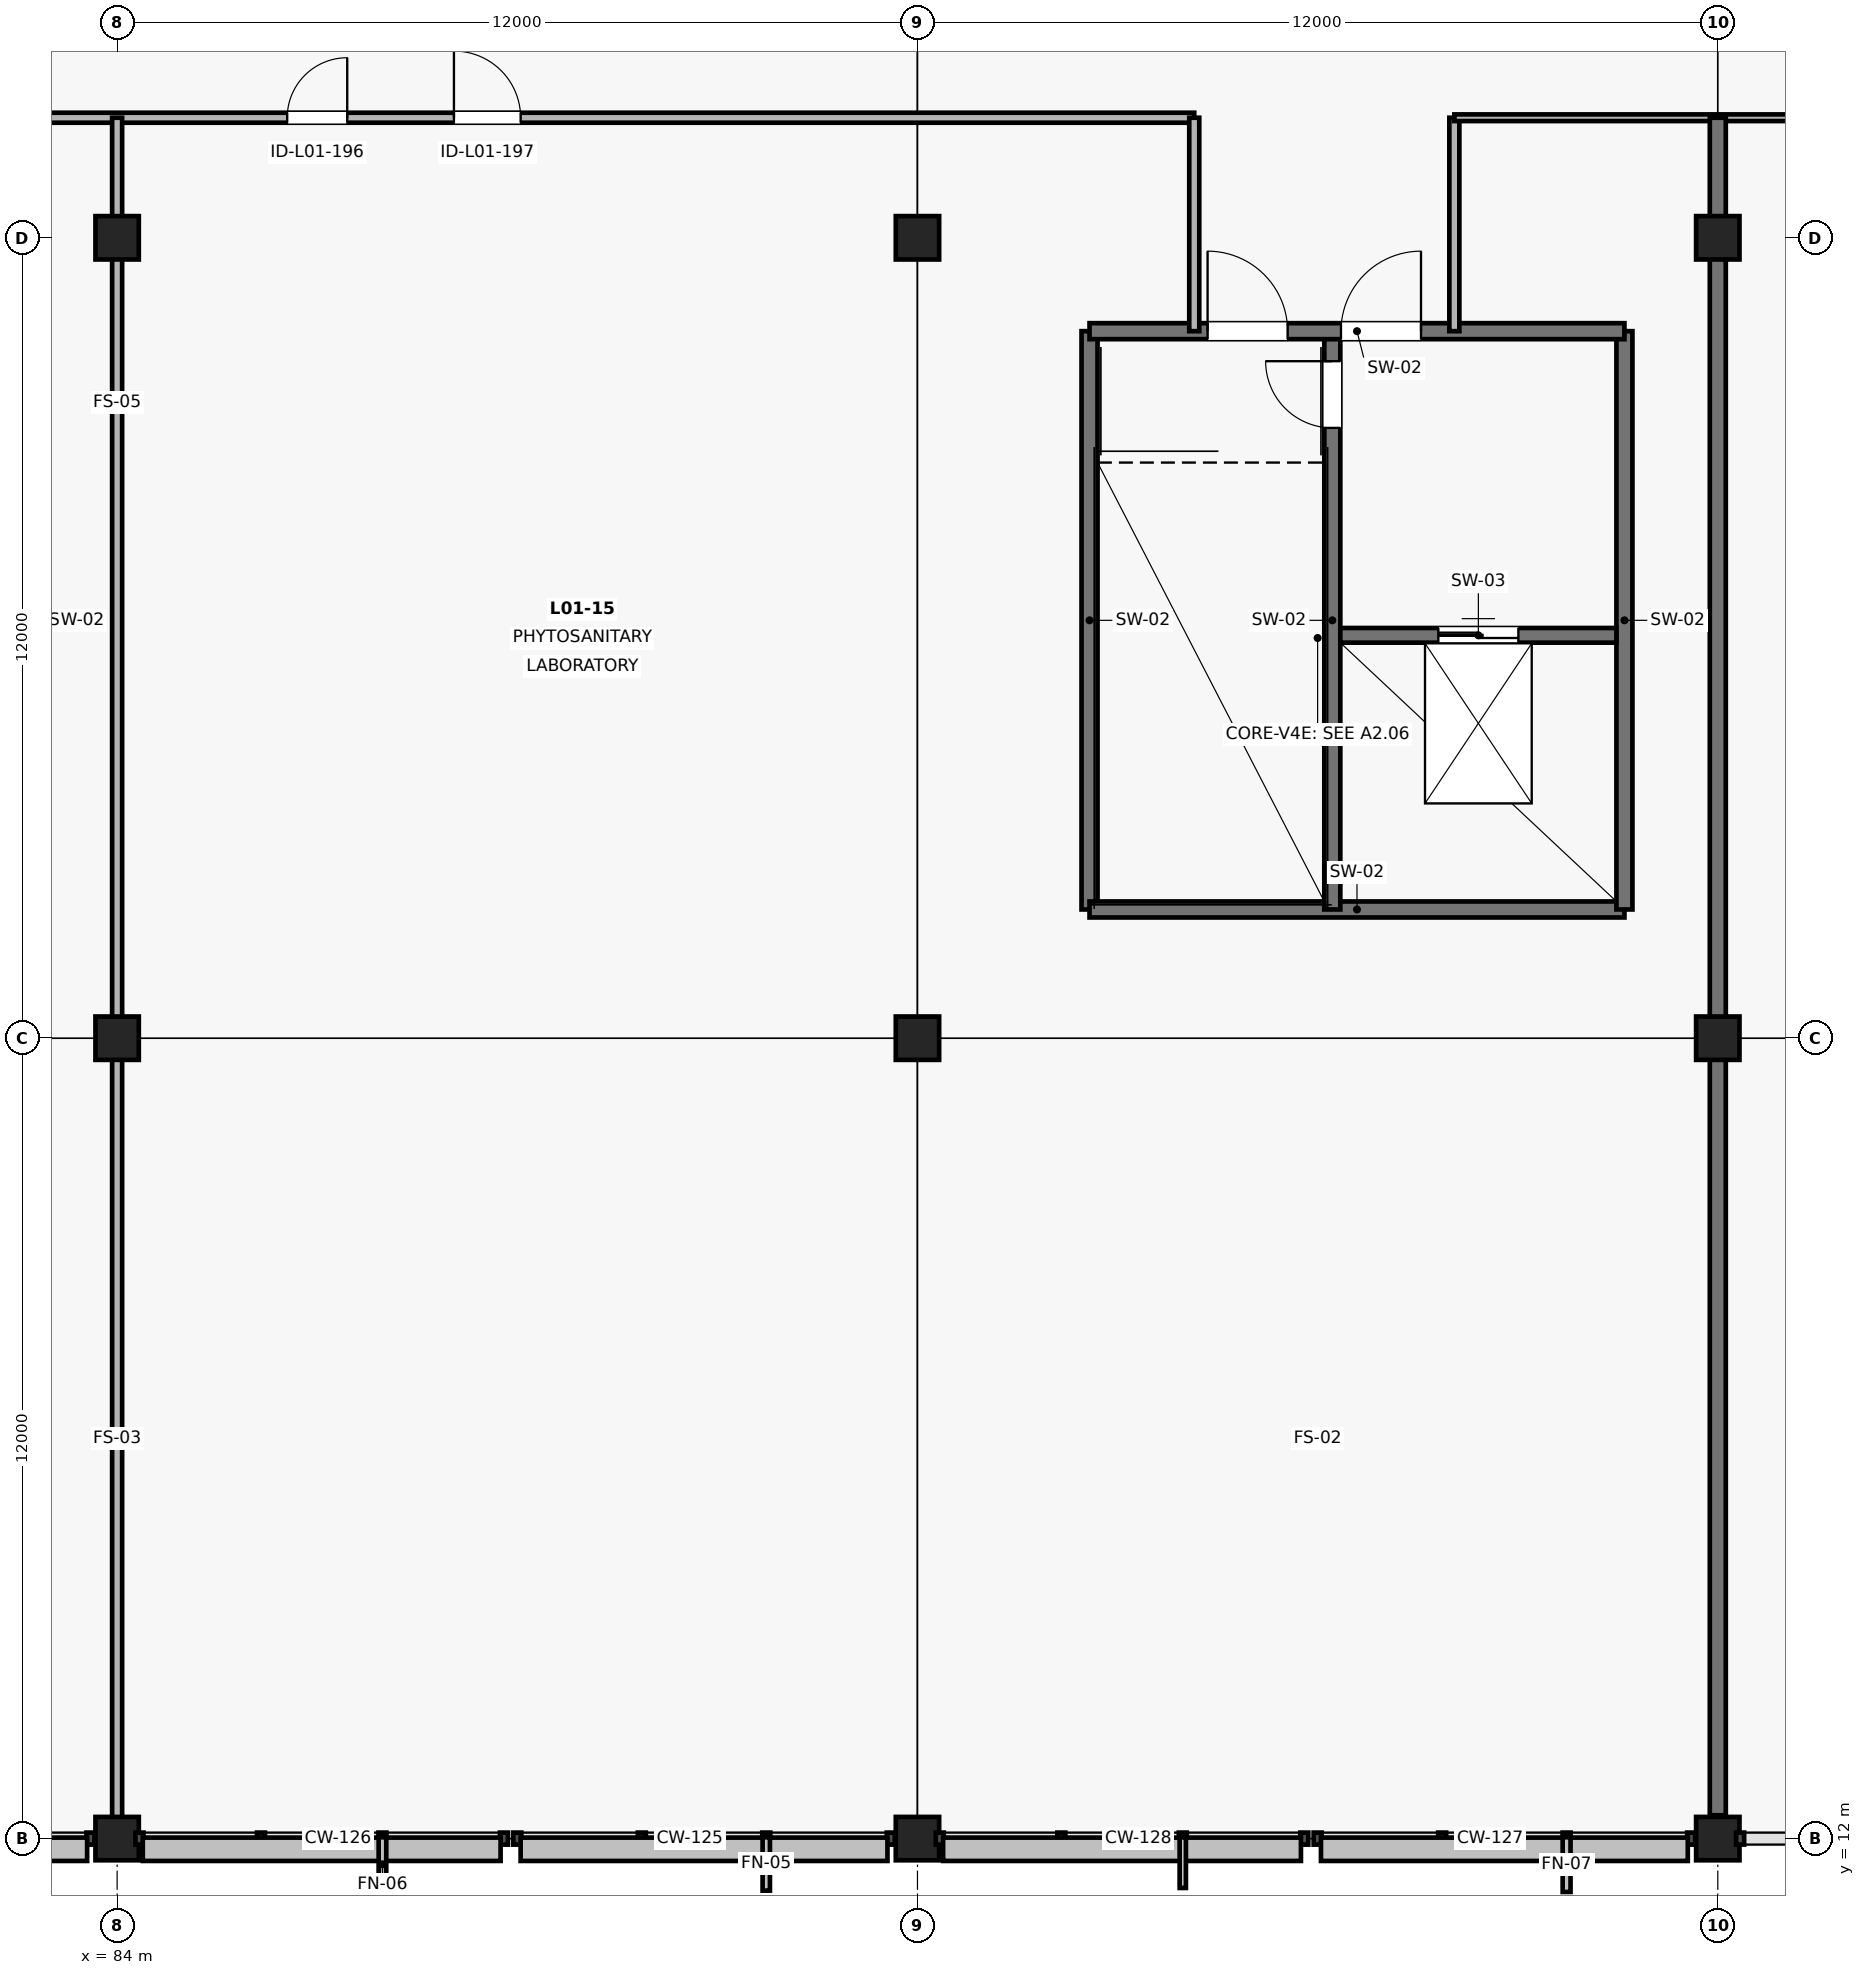
"""IFC4 building model, lengths in metres.
Left out: names, types, materials, properties, quantities, classifications, styles, units other than length and angle.
Written with IfcOpenShell. Run it as: python <this file> out.ifc"""

import sys

from ifc_helpers import new_model, si_unit, direction, frame, frame_2d, origin, origin_2d, place, context, subcontext, project, spatial, rectangle, extrude, element, fill, save


model = new_model("IFC4")
c1 = context("Model", 3, precision=1e-05, world=origin(), true_north=direction((0.0, 1.0)))
c2 = subcontext(c1, "Body", "Model", "MODEL_VIEW")
j1 = project(units=[si_unit("LENGTHUNIT", "METRE"), si_unit("PLANEANGLEUNIT", "RADIAN")], contexts=[c1])
p1 = place(None, origin())
s1 = spatial("IfcSite", under=j1, at=p1, CompositionType="ELEMENT")
p2 = place(p1, origin())
s2 = spatial("IfcBuilding", under=s1, at=p2, CompositionType="ELEMENT")
p3 = place(p2, frame((0.0, 0.0, 6.6)))
s3 = spatial("IfcBuildingStorey", under=s2, at=p3, CompositionType="ELEMENT", Elevation=6.6)
for number, where, z_axis, x_axis in (
    (1, (84.0, 12.0, 0.0), (0.0, 0.0, 1.0), (1.0, 0.0, 0.0)),
    (2, (84.0, 24.0, 0.0), (0.0, 0.0, 1.0), (1.0, 0.0, 0.0)),
    (3, (84.0, 36.0, 0.0), (0.0, 0.0, 1.0), (1.0, 0.0, 0.0)),
    (4, (96.0, 12.0, 0.0), (0.0, 0.0, 1.0), (1.0, 0.0, 0.0)),
    (5, (96.0, 24.0, 0.0), (0.0, 0.0, 1.0), (1.0, 0.0, 0.0)),
    (6, (96.0, 36.0, 0.0), (0.0, 0.0, 1.0), (1.0, 0.0, 0.0)),
):
    element("IfcColumn", number, at=place(p3, frame(where, z_axis=z_axis, x_axis=x_axis)), inside=s3, PredefinedType="COLUMN", context=c2, shape_type="SweptSolid", body=[
        extrude(rectangle(XDim=0.65, YDim=0.65, at=origin_2d()), origin(), (0.0, 0.0, 1.0), 5.2),
    ])
for number, where, z_axis, x_axis in (
    (7, (108.0, 12.0, 0.0), (0.0, 0.0, 1.0), (1.0, 0.0, 0.0)),
    (8, (108.0, 24.0, 0.0), (0.0, 0.0, 1.0), (1.0, 0.0, 0.0)),
    (9, (108.0, 36.0, 0.0), (0.0, 0.0, 1.0), (1.0, 0.0, 0.0)),
):
    element("IfcColumn", number, at=place(p3, frame(where, z_axis=z_axis, x_axis=x_axis)), inside=s3, PredefinedType="COLUMN", context=c2, shape_type="SweptSolid", body=[
        extrude(rectangle(XDim=0.65, YDim=0.65, at=origin_2d()), origin(), (0.0, 0.0, 1.0), 4.8),
    ])
p4 = place(p3, frame((98.58, 34.6, 0.0), z_axis=(0.0, 0.0, 1.0), x_axis=(0.0, -1.0, 0.0)))
e10 = element("IfcWall", 10, at=p4, inside=s3, PredefinedType="SHEAR", context=c2, shape_type="SweptSolid", body=[
    extrude(rectangle(XDim=8.67, YDim=0.24, at=frame_2d((4.335, 0.0))), origin(), (0.0, 0.0, 1.0), 4.59),
])
p5 = place(p3, frame((98.58, 25.93, 0.0), z_axis=(0.0, 0.0, 1.0), x_axis=(1.0, 0.0, 0.0)))
e11 = element("IfcWall", 11, at=p5, inside=s3, PredefinedType="SHEAR", context=c2, shape_type="SweptSolid", body=[
    extrude(rectangle(XDim=8.02, YDim=0.24, at=frame_2d((4.01, 0.0))), origin(), (0.0, 0.0, 1.0), 4.59),
])
p6 = place(p3, frame((102.22, 25.93, 0.0), z_axis=(0.0, 0.0, 1.0), x_axis=(0.0, 1.0, 0.0)))
e12 = element("IfcWall", 12, at=p6, inside=s3, PredefinedType="SHEAR", context=c2, shape_type="SweptSolid", body=[
    extrude(rectangle(XDim=8.67, YDim=0.24, at=frame_2d((4.335, 0.0))), origin(), (0.0, 0.0, 1.0), 4.59),
])
p7 = place(p6, frame((7.22, 0.0, 0.0)))
e13 = element("IfcOpeningElement", 13, at=p7, cuts=e12, PredefinedType="OPENING", context=c2, shape_type="SweptSolid", body=[
    extrude(rectangle(XDim=1.0, YDim=2.2, at=frame_2d((0.5, 1.1))), frame((0.0, 0.135, 0.0), z_axis=(0.0, -1.0, 0.0), x_axis=(1.0, 0.0, 0.0)), (0.0, 0.0, 1.0), 0.27),
])
p8 = place(p3, frame((106.6, 25.93, 0.0), z_axis=(0.0, 0.0, 1.0), x_axis=(0.0, 1.0, 0.0)))
e14 = element("IfcWall", 14, at=p8, inside=s3, PredefinedType="SHEAR", context=c2, shape_type="SweptSolid", body=[
    extrude(rectangle(XDim=8.67, YDim=0.24, at=frame_2d((4.335, 0.0))), origin(), (0.0, 0.0, 1.0), 4.59),
])
p9 = place(p3, frame((98.58, 34.6, 0.0), z_axis=(0.0, 0.0, 1.0), x_axis=(1.0, 0.0, 0.0)))
e15 = element("IfcWall", 15, at=p9, inside=s3, PredefinedType="SHEAR", context=c2, shape_type="SweptSolid", body=[
    extrude(rectangle(XDim=8.02, YDim=0.24, at=frame_2d((4.01, 0.0))), origin(), (0.0, 0.0, 1.0), 4.59),
])
p10 = place(p9, frame((1.77, 0.0, 0.0)))
e16 = element("IfcOpeningElement", 16, at=p10, cuts=e15, PredefinedType="OPENING", context=c2, shape_type="SweptSolid", body=[
    extrude(rectangle(XDim=1.2, YDim=2.2, at=frame_2d((0.6, 1.1))), frame((0.0, 0.135, 0.0), z_axis=(0.0, -1.0, 0.0), x_axis=(1.0, 0.0, 0.0)), (0.0, 0.0, 1.0), 0.27),
])
p11 = place(p9, frame((3.77, 0.0, 0.0)))
e17 = element("IfcOpeningElement", 17, at=p11, cuts=e15, PredefinedType="OPENING", context=c2, shape_type="SweptSolid", body=[
    extrude(rectangle(XDim=1.2, YDim=2.2, at=frame_2d((0.6, 1.1))), frame((0.0, 0.135, 0.0), z_axis=(0.0, -1.0, 0.0), x_axis=(1.0, 0.0, 0.0)), (0.0, 0.0, 1.0), 0.27),
])
p12 = place(p3, frame((102.34, 30.04, 0.0), z_axis=(0.0, 0.0, 1.0), x_axis=(1.0, 0.0, 0.0)))
e18 = element("IfcWall", 18, at=p12, inside=s3, PredefinedType="SHEAR", context=c2, shape_type="SweptSolid", body=[
    extrude(rectangle(XDim=4.14, YDim=0.22, at=frame_2d((2.07, 0.0))), origin(), (0.0, 0.0, 1.0), 4.59),
])
p13 = place(p12, frame((1.47, 0.0, 0.0)))
e19 = element("IfcOpeningElement", 19, at=p13, cuts=e18, PredefinedType="OPENING", context=c2, shape_type="SweptSolid", body=[
    extrude(rectangle(XDim=1.2, YDim=2.2, at=frame_2d((0.6, 1.1))), frame((0.0, 0.125, 0.0), z_axis=(0.0, -1.0, 0.0), x_axis=(1.0, 0.0, 0.0)), (0.0, 0.0, 1.0), 0.25),
])
p14 = place(p3, frame((80.05, 37.8, 0.0), z_axis=(0.0, 0.0, 1.0), x_axis=(1.0, 0.0, 0.0)))
e20 = element("IfcWall", 20, at=p14, inside=s3, PredefinedType="PARTITIONING", context=c2, shape_type="SweptSolid", body=[
    extrude(rectangle(XDim=20.1, YDim=0.15, at=frame_2d((10.05, 0.0))), origin(), (0.0, 0.0, 1.0), 4.385),
])
p15 = place(p14, frame((6.5, 0.0, 0.0)))
e21 = element("IfcOpeningElement", 21, at=p15, cuts=e20, PredefinedType="OPENING", context=c2, shape_type="SweptSolid", body=[
    extrude(rectangle(XDim=0.9, YDim=2.1, at=frame_2d((0.45, 1.05))), frame((0.0, 0.09, 0.0), z_axis=(0.0, -1.0, 0.0), x_axis=(1.0, 0.0, 0.0)), (0.0, 0.0, 1.0), 0.18),
])
p16 = place(p14, frame((9.0, 0.0, 0.0)))
e22 = element("IfcOpeningElement", 22, at=p16, cuts=e20, PredefinedType="OPENING", context=c2, shape_type="SweptSolid", body=[
    extrude(rectangle(XDim=1.0, YDim=2.2, at=frame_2d((0.5, 1.1))), frame((0.0, 0.09, 0.0), z_axis=(0.0, -1.0, 0.0), x_axis=(1.0, 0.0, 0.0)), (0.0, 0.0, 1.0), 0.18),
])
for number, where, z_axis, x_axis in (
    (23, (100.15, 34.6, 0.0), (0.0, 0.0, 1.0), (0.0, 1.0, 0.0)),
    (24, (104.05, 34.6, 0.0), (0.0, 0.0, 1.0), (0.0, 1.0, 0.0)),
):
    element("IfcWall", number, at=place(p3, frame(where, z_axis=z_axis, x_axis=x_axis)), inside=s3, PredefinedType="PARTITIONING", context=c2, shape_type="SweptSolid", body=[
        extrude(rectangle(XDim=3.2, YDim=0.15, at=frame_2d((1.6, 0.0))), origin(), (0.0, 0.0, 1.0), 3.574),
    ])
p17 = place(p3, frame((104.05, 37.8, 0.0), z_axis=(0.0, 0.0, 1.0), x_axis=(1.0, 0.0, 0.0)))
e25 = element("IfcWall", 25, at=p17, inside=s3, PredefinedType="PARTITIONING", context=c2, shape_type="SweptSolid", body=[
    extrude(rectangle(XDim=8.1, YDim=0.1, at=frame_2d((4.05, 0.0))), origin(), (0.0, 0.0, 1.0), 3.783),
])
p18 = place(p3, frame((84.0, 12.04, 0.0), z_axis=(0.0, 0.0, 1.0), x_axis=(0.0, 1.0, 0.0)))
e26 = element("IfcWall", 26, at=p18, inside=s3, PredefinedType="PARTITIONING", context=c2, shape_type="SweptSolid", body=[
    extrude(rectangle(XDim=25.76, YDim=0.15, at=frame_2d((12.88, 0.0))), origin(), (0.0, 0.0, 1.0), 3.935),
])
p19 = place(p3, frame((108.0, 12.35, 0.0), z_axis=(0.0, 0.0, 1.0), x_axis=(0.0, 1.0, 0.0)))
e27 = element("IfcWall", 27, at=p19, inside=s3, PredefinedType="SHEAR", context=c2, shape_type="SweptSolid", body=[
    extrude(rectangle(XDim=25.45, YDim=0.24, at=frame_2d((12.725, 0.0))), origin(), (0.0, 0.0, 1.0), 3.433),
])
p20 = place(p10, origin())
e28 = element("IfcDoor", 28, at=p20, inside=s3, OperationType="SINGLE_SWING_LEFT", PredefinedType="DOOR", context=c2, shape_type="SweptSolid", body=[
    extrude(rectangle(XDim=1.2, YDim=2.2, at=frame_2d((0.6, 1.1))), frame((0.0, 0.025, 0.0), z_axis=(0.0, -1.0, 0.0), x_axis=(1.0, 0.0, 0.0)), (0.0, 0.0, 1.0), 0.05),
])
fill(e16, e28)
p21 = place(p11, origin())
e29 = element("IfcDoor", 29, at=p21, inside=s3, OperationType="SINGLE_SWING_RIGHT", PredefinedType="DOOR", context=c2, shape_type="SweptSolid", body=[
    extrude(rectangle(XDim=1.2, YDim=2.2, at=frame_2d((0.6, 1.1))), frame((0.0, 0.025, 0.0), z_axis=(0.0, -1.0, 0.0), x_axis=(1.0, 0.0, 0.0)), (0.0, 0.0, 1.0), 0.05),
])
fill(e17, e29)
p22 = place(p7, origin())
e30 = element("IfcDoor", 30, at=p22, inside=s3, OperationType="SINGLE_SWING_RIGHT", PredefinedType="DOOR", context=c2, shape_type="SweptSolid", body=[
    extrude(rectangle(XDim=1.0, YDim=2.2, at=frame_2d((0.5, 1.1))), frame((0.0, 0.025, 0.0), z_axis=(0.0, -1.0, 0.0), x_axis=(1.0, 0.0, 0.0)), (0.0, 0.0, 1.0), 0.05),
])
fill(e13, e30)
p23 = place(p13, origin())
e31 = element("IfcDoor", 31, at=p23, inside=s3, OperationType="DOUBLE_DOOR_SLIDING", PredefinedType="DOOR", context=c2, shape_type="SweptSolid", body=[
    extrude(rectangle(XDim=1.2, YDim=2.2, at=frame_2d((0.6, 1.1))), frame((0.0, 0.025, 0.0), z_axis=(0.0, -1.0, 0.0), x_axis=(1.0, 0.0, 0.0)), (0.0, 0.0, 1.0), 0.05),
])
fill(e19, e31)
p24 = place(p15, origin())
e32 = element("IfcDoor", 32, at=p24, inside=s3, OperationType="SINGLE_SWING_RIGHT", PredefinedType="DOOR", context=c2, shape_type="SweptSolid", body=[
    extrude(rectangle(XDim=0.9, YDim=2.1, at=frame_2d((0.45, 1.05))), frame((0.0, 0.025, 0.0), z_axis=(0.0, -1.0, 0.0), x_axis=(1.0, 0.0, 0.0)), (0.0, 0.0, 1.0), 0.05),
])
fill(e21, e32)
p25 = place(p16, origin())
e33 = element("IfcDoor", 33, at=p25, inside=s3, OperationType="SINGLE_SWING_LEFT", PredefinedType="DOOR", context=c2, shape_type="SweptSolid", body=[
    extrude(rectangle(XDim=1.0, YDim=2.2, at=frame_2d((0.5, 1.1))), frame((0.0, 0.025, 0.0), z_axis=(0.0, -1.0, 0.0), x_axis=(1.0, 0.0, 0.0)), (0.0, 0.0, 1.0), 0.05),
])
fill(e22, e33)
save(model, sys.argv[1])
